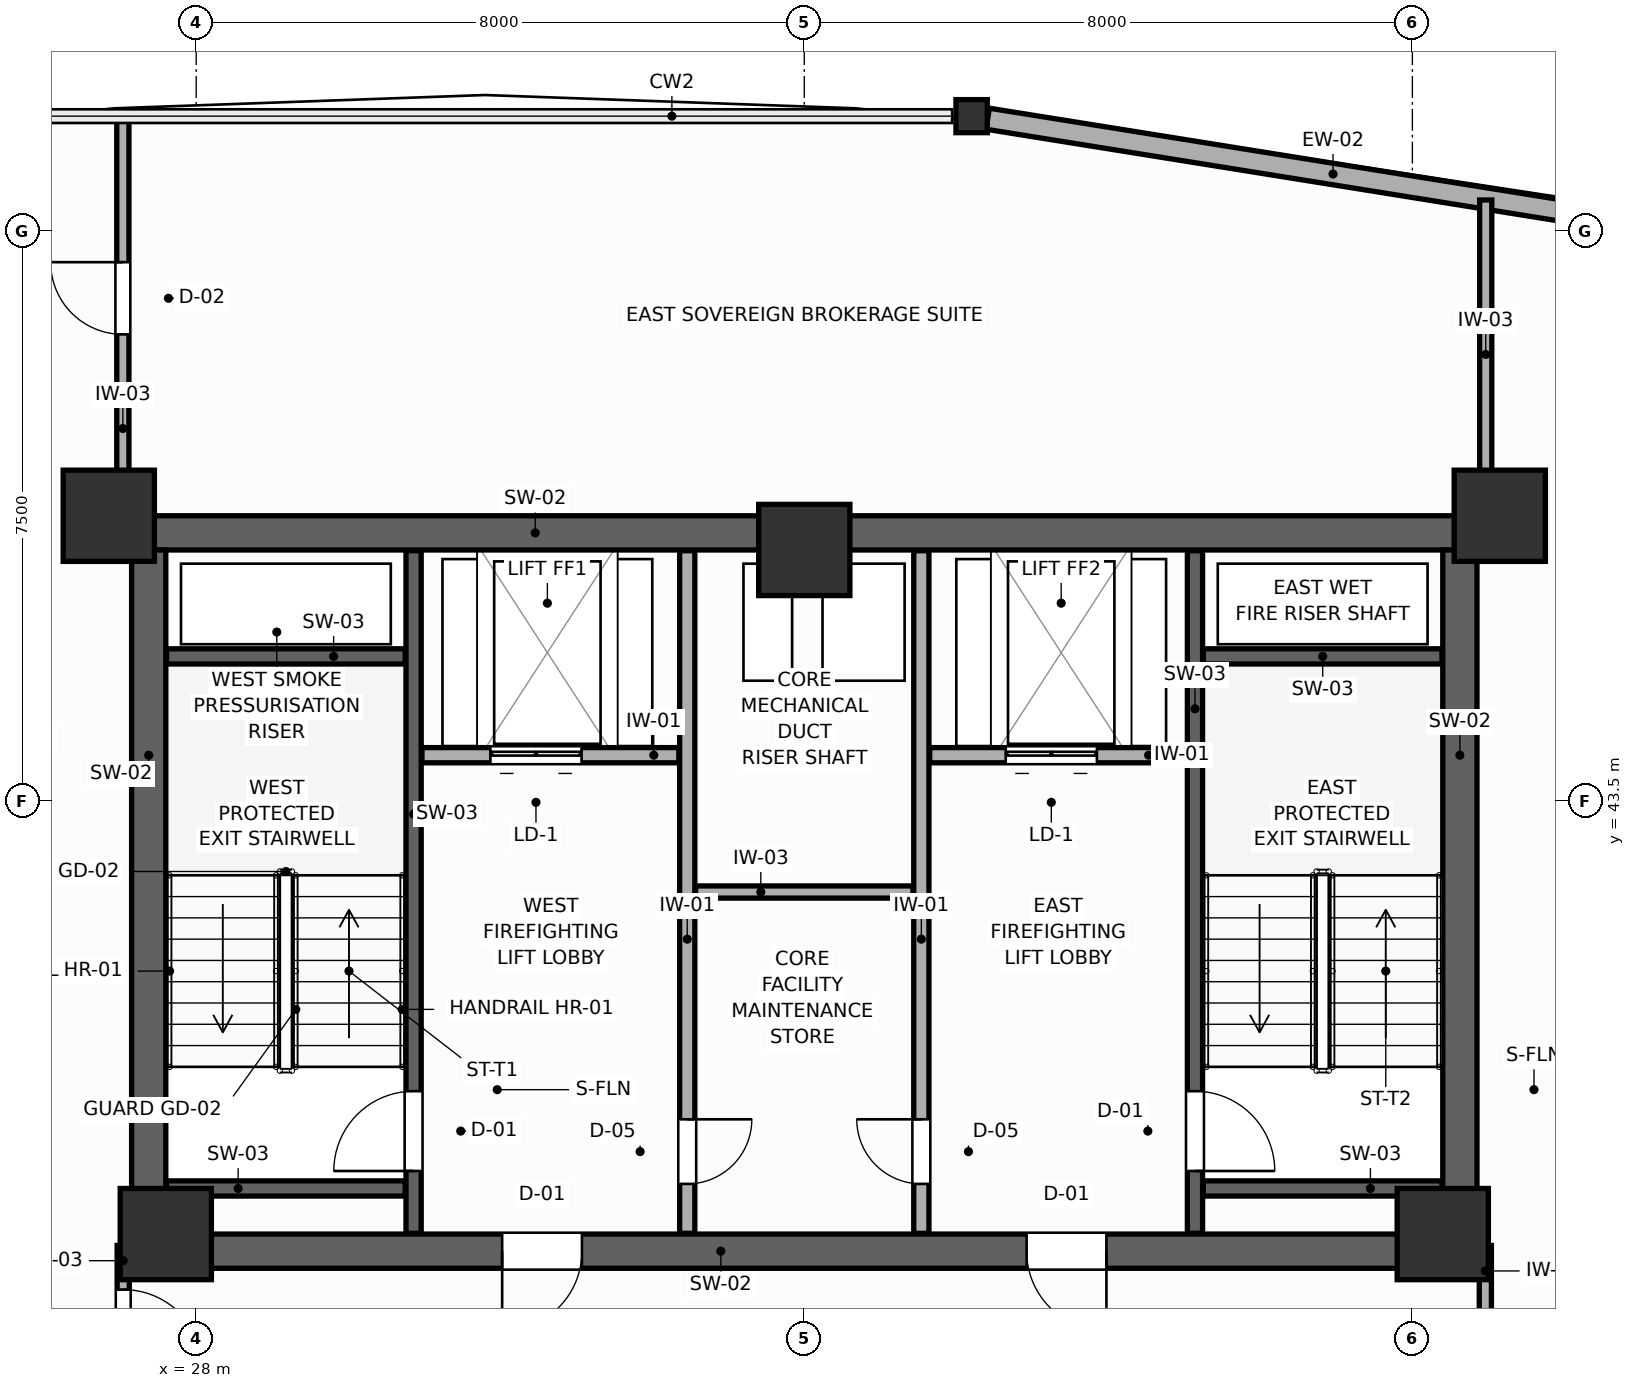
"""IFC4 building model, lengths in metres.
Left out: names, types, materials, properties, quantities, classifications, styles, units other than length and angle.
Written with IfcOpenShell. Run it as: python <this file> out.ifc"""

import sys

from ifc_helpers import new_model, si_unit, direction, frame, frame_2d, origin, origin_2d, place, context, subcontext, project, spatial, rectangle, i_section, extrude, source, transform, mapped, element, fill, save


model = new_model("IFC4")
c1 = context("Model", 3, precision=1e-05, world=origin(), true_north=direction((0.0, 1.0)))
c2 = subcontext(c1, "Body", "Model", "MODEL_VIEW")
j1 = project(units=[si_unit("LENGTHUNIT", "METRE"), si_unit("PLANEANGLEUNIT", "RADIAN")], contexts=[c1])
p1 = place(None, origin())
s1 = spatial("IfcSite", under=j1, at=p1, CompositionType="ELEMENT")
p2 = place(p1, origin())
s2 = spatial("IfcBuilding", under=s1, at=p2, CompositionType="ELEMENT")
p3 = place(p2, frame((0.0, 0.0, 157.8)))
s3 = spatial("IfcBuildingStorey", under=s2, at=p3, CompositionType="ELEMENT", Elevation=157.8)
p4 = place(p3, frame((27.15, 47.025, 0.0), z_axis=(0.0, 0.0, 1.0), x_axis=(1.0, 0.0, 0.0)))
e1 = element("IfcWall", 1, at=p4, inside=s3, PredefinedType="SHEAR", context=c2, shape_type="SweptSolid", body=[
    extrude(rectangle(XDim=17.7, YDim=0.45, at=frame_2d((8.85, 0.0))), origin(), (0.0, 0.0, 1.0), 3.6),
])
p5 = place(p3, frame((27.15, 37.575, 0.0), z_axis=(0.0, 0.0, 1.0), x_axis=(1.0, 0.0, 0.0)))
e2 = element("IfcWall", 2, at=p5, inside=s3, PredefinedType="SHEAR", context=c2, shape_type="SweptSolid", body=[
    extrude(rectangle(XDim=17.7, YDim=0.45, at=frame_2d((8.85, 0.0))), origin(), (0.0, 0.0, 1.0), 3.6),
])
p6 = place(p5, frame((4.875, 0.0, 0.0)))
e3 = element("IfcOpeningElement", 3, at=p6, cuts=e2, PredefinedType="OPENING", context=c2, shape_type="SweptSolid", body=[
    extrude(rectangle(XDim=1.05, YDim=2.1, at=frame_2d((0.525, 1.05))), frame((0.0, 0.235, 0.0), z_axis=(0.0, -1.0, 0.0), x_axis=(1.0, 0.0, 0.0)), (0.0, 0.0, 1.0), 0.47),
])
p7 = place(p5, frame((11.775, 0.0, 0.0)))
e4 = element("IfcOpeningElement", 4, at=p7, cuts=e2, PredefinedType="OPENING", context=c2, shape_type="SweptSolid", body=[
    extrude(rectangle(XDim=1.05, YDim=2.1, at=frame_2d((0.525, 1.05))), frame((0.0, 0.235, 0.0), z_axis=(0.0, -1.0, 0.0), x_axis=(1.0, 0.0, 0.0)), (0.0, 0.0, 1.0), 0.47),
])
for number, where, z_axis, x_axis in (
    (5, (27.375, 37.8, 0.0), (0.0, 0.0, 1.0), (0.0, 1.0, 0.0)),
    (6, (44.625, 37.8, 0.0), (0.0, 0.0, 1.0), (0.0, 1.0, 0.0)),
):
    element("IfcWall", number, at=place(p3, frame(where, z_axis=z_axis, x_axis=x_axis)), inside=s3, PredefinedType="SHEAR", context=c2, shape_type="SweptSolid", body=[
        extrude(rectangle(XDim=9.0, YDim=0.45, at=frame_2d((4.5, 0.0))), origin(), (0.0, 0.0, 1.0), 3.6),
    ])
m1 = source(origin(), c2, "Body", "SweptSolid", [
    extrude(rectangle(XDim=1.2, YDim=1.2, at=origin_2d()), origin(), (0.0, 0.0, 1.0), 3.6),
])
for number, where, z_axis, x_axis in (
    (7, (26.85, 47.25, 0.0), (0.0, 0.0, 1.0), (1.0, 0.0, 0.0)),
    (8, (45.15, 47.25, 0.0), (0.0, 0.0, 1.0), (1.0, 0.0, 0.0)),
    (9, (27.6, 37.8, 0.0), (0.0, 0.0, 1.0), (1.0, 0.0, 0.0)),
    (10, (44.4, 37.8, 0.0), (0.0, 0.0, 1.0), (1.0, 0.0, 0.0)),
    (11, (36.0, 46.8, 0.0), (0.0, 0.0, 1.0), (1.0, 0.0, 0.0)),
):
    element("IfcColumn", number, at=place(p3, frame(where, z_axis=z_axis, x_axis=x_axis)), inside=s3, PredefinedType="COLUMN", context=c2, shape_type="MappedRepresentation", body=[
        mapped(m1, transform((0.0, 0.0, 0.0), scale=1.0)),
    ])
m2 = source(origin(), c2, "Body", "SweptSolid", [
    extrude(i_section(OverallWidth=0.412, OverallDepth=0.435, WebThickness=0.033, FlangeThickness=0.053, FilletRadius=0.015, at=origin_2d()), origin(), (0.0, 0.0, 1.0), 3.6),
])
p8 = place(p3, frame((38.201, 52.508, 0.0), z_axis=(0.0, 0.0, 1.0), x_axis=(1.0, 0.0, 0.0)))
e12 = element("IfcColumn", 12, at=p8, inside=s3, PredefinedType="COLUMN", context=c2, shape_type="MappedRepresentation", body=[
    mapped(m2, transform((0.0, 0.0, 0.0), scale=1.0)),
])
p9 = place(p3, frame((52.708, 50.185, 0.0), z_axis=(0.0, 0.0, 1.0), x_axis=(-0.98742305143, 0.158100339991, 0.0)))
e13 = element("IfcWall", 13, at=p9, inside=s3, PredefinedType="SOLIDWALL", context=c2, shape_type="SweptSolid", body=[
    extrude(rectangle(XDim=14.477, YDim=0.28, at=frame_2d((7.239, 0.0))), origin(), (0.0, 0.0, 1.0), 3.0),
])
p10 = place(p9, frame((3.394, 0.0, 0.75)))
e14 = element("IfcOpeningElement", 14, at=p10, cuts=e13, PredefinedType="OPENING", context=c2, shape_type="SweptSolid", body=[
    extrude(rectangle(XDim=1.7, YDim=1.75, at=frame_2d((0.85, 0.875))), frame((0.0, 0.15, 0.0), z_axis=(0.0, -1.0, 0.0), x_axis=(1.0, 0.0, 0.0)), (0.0, 0.0, 1.0), 0.3),
])
p11 = place(p3, frame((30.86, 37.81, 0.0), z_axis=(0.0, 0.0, 1.0), x_axis=(0.0, 1.0, 0.0)))
e15 = element("IfcWall", 15, at=p11, inside=s3, PredefinedType="SHEAR", context=c2, shape_type="SweptSolid", body=[
    extrude(rectangle(XDim=8.98, YDim=0.2, at=frame_2d((4.49, 0.0))), origin(), (0.0, 0.0, 1.0), 3.6),
])
p12 = place(p11, frame((0.82, 0.0, 0.0)))
e16 = element("IfcOpeningElement", 16, at=p12, cuts=e15, PredefinedType="OPENING", context=c2, shape_type="SweptSolid", body=[
    extrude(rectangle(XDim=1.05, YDim=2.1, at=frame_2d((0.525, 1.05))), frame((0.0, 0.11, 0.0), z_axis=(0.0, -1.0, 0.0), x_axis=(1.0, 0.0, 0.0)), (0.0, 0.0, 1.0), 0.22),
])
for number, where, z_axis, x_axis in (
    (17, (27.61, 45.4, 0.0), (0.0, 0.0, 1.0), (1.0, 0.0, 0.0)),
    (18, (27.61, 38.4, 0.0), (0.0, 0.0, 1.0), (1.0, 0.0, 0.0)),
):
    element("IfcWall", number, at=place(p3, frame(where, z_axis=z_axis, x_axis=x_axis)), inside=s3, PredefinedType="SHEAR", context=c2, shape_type="SweptSolid", body=[
        extrude(rectangle(XDim=3.14, YDim=0.2, at=frame_2d((1.57, 0.0))), origin(), (0.0, 0.0, 1.0), 3.6),
    ])
p13 = place(p3, frame((41.14, 37.81, 0.0), z_axis=(0.0, 0.0, 1.0), x_axis=(0.0, 1.0, 0.0)))
e19 = element("IfcWall", 19, at=p13, inside=s3, PredefinedType="SHEAR", context=c2, shape_type="SweptSolid", body=[
    extrude(rectangle(XDim=8.98, YDim=0.2, at=frame_2d((4.49, 0.0))), origin(), (0.0, 0.0, 1.0), 3.6),
])
p14 = place(p13, frame((0.82, 0.0, 0.0)))
e20 = element("IfcOpeningElement", 20, at=p14, cuts=e19, PredefinedType="OPENING", context=c2, shape_type="SweptSolid", body=[
    extrude(rectangle(XDim=1.05, YDim=2.1, at=frame_2d((0.525, 1.05))), frame((0.0, 0.11, 0.0), z_axis=(0.0, -1.0, 0.0), x_axis=(1.0, 0.0, 0.0)), (0.0, 0.0, 1.0), 0.22),
])
for number, where, z_axis, x_axis in (
    (21, (41.25, 45.4, 0.0), (0.0, 0.0, 1.0), (1.0, 0.0, 0.0)),
    (22, (41.25, 38.4, 0.0), (0.0, 0.0, 1.0), (1.0, 0.0, 0.0)),
):
    element("IfcWall", number, at=place(p3, frame(where, z_axis=z_axis, x_axis=x_axis)), inside=s3, PredefinedType="SHEAR", context=c2, shape_type="SweptSolid", body=[
        extrude(rectangle(XDim=3.14, YDim=0.2, at=frame_2d((1.57, 0.0))), origin(), (0.0, 0.0, 1.0), 3.6),
    ])
p15 = place(p3, frame((30.97, 44.1, 0.0), z_axis=(0.0, 0.0, 1.0), x_axis=(1.0, 0.0, 0.0)))
e23 = element("IfcWall", 23, at=p15, inside=s3, PredefinedType="PARTITIONING", context=c2, shape_type="SweptSolid", body=[
    extrude(rectangle(XDim=3.38, YDim=0.2, at=frame_2d((1.69, 0.0))), origin(), (0.0, 0.0, 1.0), 3.4),
])
p16 = place(p15, frame((0.9, 0.0, 0.0)))
e24 = element("IfcOpeningElement", 24, at=p16, cuts=e23, PredefinedType="OPENING", context=c2, shape_type="SweptSolid", body=[
    extrude(rectangle(XDim=1.2, YDim=2.1, at=frame_2d((0.6, 1.05))), frame((0.0, 0.11, 0.0), z_axis=(0.0, -1.0, 0.0), x_axis=(1.0, 0.0, 0.0)), (0.0, 0.0, 1.0), 0.22),
])
p17 = place(p3, frame((37.65, 44.1, 0.0), z_axis=(0.0, 0.0, 1.0), x_axis=(1.0, 0.0, 0.0)))
e25 = element("IfcWall", 25, at=p17, inside=s3, PredefinedType="PARTITIONING", context=c2, shape_type="SweptSolid", body=[
    extrude(rectangle(XDim=3.38, YDim=0.2, at=frame_2d((1.69, 0.0))), origin(), (0.0, 0.0, 1.0), 3.4),
])
p18 = place(p17, frame((1.0, 0.0, 0.0)))
e26 = element("IfcOpeningElement", 26, at=p18, cuts=e25, PredefinedType="OPENING", context=c2, shape_type="SweptSolid", body=[
    extrude(rectangle(XDim=1.2, YDim=2.1, at=frame_2d((0.6, 1.05))), frame((0.0, 0.11, 0.0), z_axis=(0.0, -1.0, 0.0), x_axis=(1.0, 0.0, 0.0)), (0.0, 0.0, 1.0), 0.22),
])
p19 = place(p3, frame((34.46, 37.81, 0.0), z_axis=(0.0, 0.0, 1.0), x_axis=(0.0, 1.0, 0.0)))
e27 = element("IfcWall", 27, at=p19, inside=s3, PredefinedType="PARTITIONING", context=c2, shape_type="SweptSolid", body=[
    extrude(rectangle(XDim=8.98, YDim=0.2, at=frame_2d((4.49, 0.0))), origin(), (0.0, 0.0, 1.0), 3.4),
])
p20 = place(p19, frame((0.65, 0.0, 0.0)))
e28 = element("IfcOpeningElement", 28, at=p20, cuts=e27, PredefinedType="OPENING", context=c2, shape_type="SweptSolid", body=[
    extrude(rectangle(XDim=0.85, YDim=2.05, at=frame_2d((0.425, 1.025))), frame((0.0, 0.11, 0.0), z_axis=(0.0, -1.0, 0.0), x_axis=(1.0, 0.0, 0.0)), (0.0, 0.0, 1.0), 0.22),
])
p21 = place(p3, frame((37.54, 37.81, 0.0), z_axis=(0.0, 0.0, 1.0), x_axis=(0.0, 1.0, 0.0)))
e29 = element("IfcWall", 29, at=p21, inside=s3, PredefinedType="PARTITIONING", context=c2, shape_type="SweptSolid", body=[
    extrude(rectangle(XDim=8.98, YDim=0.2, at=frame_2d((4.49, 0.0))), origin(), (0.0, 0.0, 1.0), 3.4),
])
p22 = place(p21, frame((0.65, 0.0, 0.0)))
e30 = element("IfcOpeningElement", 30, at=p22, cuts=e29, PredefinedType="OPENING", context=c2, shape_type="SweptSolid", body=[
    extrude(rectangle(XDim=0.85, YDim=2.05, at=frame_2d((0.425, 1.025))), frame((0.0, 0.11, 0.0), z_axis=(0.0, -1.0, 0.0), x_axis=(1.0, 0.0, 0.0)), (0.0, 0.0, 1.0), 0.22),
])
p23 = place(p3, frame((34.57, 42.3, 0.0), z_axis=(0.0, 0.0, 1.0), x_axis=(1.0, 0.0, 0.0)))
e31 = element("IfcWall", 31, at=p23, inside=s3, PredefinedType="PARTITIONING", context=c2, shape_type="SweptSolid", body=[
    extrude(rectangle(XDim=2.86, YDim=0.16, at=frame_2d((1.43, 0.0))), origin(), (0.0, 0.0, 1.0), 3.4),
])
p24 = place(p3, frame((27.04, 35.54, 0.0), z_axis=(0.0, 0.0, 1.0), x_axis=(0.0, 1.0, 0.0)))
e32 = element("IfcWall", 32, at=p24, inside=s3, PredefinedType="PARTITIONING", context=c2, shape_type="SweptSolid", body=[
    extrude(rectangle(XDim=2.11, YDim=0.16, at=frame_2d((1.055, 0.0))), origin(), (0.0, 0.0, 1.0), 3.4),
])
p25 = place(p24, frame((0.48, 0.0, 0.0)))
e33 = element("IfcOpeningElement", 33, at=p25, cuts=e32, PredefinedType="OPENING", context=c2, shape_type="SweptSolid", body=[
    extrude(rectangle(XDim=1.05, YDim=2.1, at=frame_2d((0.525, 1.05))), frame((0.0, 0.09, 0.0), z_axis=(0.0, -1.0, 0.0), x_axis=(1.0, 0.0, 0.0)), (0.0, 0.0, 1.0), 0.18),
])
p26 = place(p3, frame((44.96, 35.0, 0.0), z_axis=(0.0, 0.0, 1.0), x_axis=(0.0, 1.0, 0.0)))
e34 = element("IfcWall", 34, at=p26, inside=s3, PredefinedType="PARTITIONING", context=c2, shape_type="SweptSolid", body=[
    extrude(rectangle(XDim=2.65, YDim=0.16, at=frame_2d((1.325, 0.0))), origin(), (0.0, 0.0, 1.0), 3.4),
])
p27 = place(p26, frame((0.75, 0.0, 0.0)))
e35 = element("IfcOpeningElement", 35, at=p27, cuts=e34, PredefinedType="OPENING", context=c2, shape_type="SweptSolid", body=[
    extrude(rectangle(XDim=1.05, YDim=2.1, at=frame_2d((0.525, 1.05))), frame((0.0, 0.09, 0.0), z_axis=(0.0, -1.0, 0.0), x_axis=(1.0, 0.0, 0.0)), (0.0, 0.0, 1.0), 0.18),
])
p28 = place(p3, frame((27.035, 47.34, 0.0), z_axis=(0.0, 0.0, 1.0), x_axis=(0.0, 1.0, 0.0)))
e36 = element("IfcWall", 36, at=p28, inside=s3, PredefinedType="PARTITIONING", context=c2, shape_type="SweptSolid", body=[
    extrude(rectangle(XDim=5.147, YDim=0.16, at=frame_2d((2.574, 0.0))), origin(), (0.0, 0.0, 1.0), 3.4),
])
p29 = place(p28, frame((2.296, 0.0, 0.0)))
e37 = element("IfcOpeningElement", 37, at=p29, cuts=e36, PredefinedType="OPENING", context=c2, shape_type="SweptSolid", body=[
    extrude(rectangle(XDim=0.95, YDim=2.05, at=frame_2d((0.475, 1.025))), frame((0.0, 0.09, 0.0), z_axis=(0.0, -1.0, 0.0), x_axis=(1.0, 0.0, 0.0)), (0.0, 0.0, 1.0), 0.18),
])
p30 = place(p3, frame((44.965, 47.34, 0.0), z_axis=(0.0, 0.0, 1.0), x_axis=(0.0, 1.0, 0.0)))
e38 = element("IfcWall", 38, at=p30, inside=s3, PredefinedType="PARTITIONING", context=c2, shape_type="SweptSolid", body=[
    extrude(rectangle(XDim=4.064, YDim=0.16, at=frame_2d((2.032, 0.0))), origin(), (0.0, 0.0, 1.0), 3.4),
])
p31 = place(p12, origin())
e39 = element("IfcDoor", 39, at=p31, inside=s3, OperationType="SINGLE_SWING_LEFT", PredefinedType="DOOR", context=c2, shape_type="SweptSolid", body=[
    extrude(rectangle(XDim=1.05, YDim=2.1, at=frame_2d((0.525, 1.05))), frame((0.0, 0.025, 0.0), z_axis=(0.0, -1.0, 0.0), x_axis=(1.0, 0.0, 0.0)), (0.0, 0.0, 1.0), 0.05),
])
fill(e16, e39)
p32 = place(p14, frame((1.05, 0.0, 0.0), z_axis=(0.0, 0.0, 1.0), x_axis=(-1.0, 0.0, 0.0)))
e40 = element("IfcDoor", 40, at=p32, inside=s3, OperationType="SINGLE_SWING_RIGHT", PredefinedType="DOOR", context=c2, shape_type="SweptSolid", body=[
    extrude(rectangle(XDim=1.05, YDim=2.1, at=frame_2d((0.525, 1.05))), frame((0.0, 0.025, 0.0), z_axis=(0.0, -1.0, 0.0), x_axis=(1.0, 0.0, 0.0)), (0.0, 0.0, 1.0), 0.05),
])
fill(e20, e40)
p33 = place(p16, origin())
e41 = element("IfcDoor", 41, at=p33, inside=s3, OperationType="DOUBLE_DOOR_SLIDING", PredefinedType="DOOR", context=c2, shape_type="SweptSolid", body=[
    extrude(rectangle(XDim=1.2, YDim=2.1, at=frame_2d((0.6, 1.05))), frame((0.0, 0.025, 0.0), z_axis=(0.0, -1.0, 0.0), x_axis=(1.0, 0.0, 0.0)), (0.0, 0.0, 1.0), 0.05),
])
fill(e24, e41)
p34 = place(p18, origin())
e42 = element("IfcDoor", 42, at=p34, inside=s3, OperationType="DOUBLE_DOOR_SLIDING", PredefinedType="DOOR", context=c2, shape_type="SweptSolid", body=[
    extrude(rectangle(XDim=1.2, YDim=2.1, at=frame_2d((0.6, 1.05))), frame((0.0, 0.025, 0.0), z_axis=(0.0, -1.0, 0.0), x_axis=(1.0, 0.0, 0.0)), (0.0, 0.0, 1.0), 0.05),
])
fill(e26, e42)
p35 = place(p20, frame((0.85, 0.0, 0.0), z_axis=(0.0, 0.0, 1.0), x_axis=(-1.0, 0.0, 0.0)))
e43 = element("IfcDoor", 43, at=p35, inside=s3, OperationType="SINGLE_SWING_LEFT", PredefinedType="DOOR", context=c2, shape_type="SweptSolid", body=[
    extrude(rectangle(XDim=0.85, YDim=2.05, at=frame_2d((0.425, 1.025))), frame((0.0, 0.025, 0.0), z_axis=(0.0, -1.0, 0.0), x_axis=(1.0, 0.0, 0.0)), (0.0, 0.0, 1.0), 0.05),
])
fill(e28, e43)
p36 = place(p22, origin())
e44 = element("IfcDoor", 44, at=p36, inside=s3, OperationType="SINGLE_SWING_RIGHT", PredefinedType="DOOR", context=c2, shape_type="SweptSolid", body=[
    extrude(rectangle(XDim=0.85, YDim=2.05, at=frame_2d((0.425, 1.025))), frame((0.0, 0.025, 0.0), z_axis=(0.0, -1.0, 0.0), x_axis=(1.0, 0.0, 0.0)), (0.0, 0.0, 1.0), 0.05),
])
fill(e30, e44)
p37 = place(p25, frame((1.05, 0.0, 0.0), z_axis=(0.0, 0.0, 1.0), x_axis=(-1.0, 0.0, 0.0)))
e45 = element("IfcDoor", 45, at=p37, inside=s3, OperationType="SINGLE_SWING_RIGHT", PredefinedType="DOOR", context=c2, shape_type="SweptSolid", body=[
    extrude(rectangle(XDim=1.05, YDim=2.1, at=frame_2d((0.525, 1.05))), frame((0.0, 0.025, 0.0), z_axis=(0.0, -1.0, 0.0), x_axis=(1.0, 0.0, 0.0)), (0.0, 0.0, 1.0), 0.05),
])
fill(e33, e45)
p38 = place(p29, origin())
e46 = element("IfcDoor", 46, at=p38, inside=s3, OperationType="SINGLE_SWING_RIGHT", PredefinedType="DOOR", context=c2, shape_type="SweptSolid", body=[
    extrude(rectangle(XDim=0.95, YDim=2.05, at=frame_2d((0.475, 1.025))), frame((0.0, 0.025, 0.0), z_axis=(0.0, -1.0, 0.0), x_axis=(1.0, 0.0, 0.0)), (0.0, 0.0, 1.0), 0.05),
])
fill(e37, e46)
p39 = place(p6, frame((1.05, 0.0, 0.0), z_axis=(0.0, 0.0, 1.0), x_axis=(-1.0, 0.0, 0.0)))
e47 = element("IfcDoor", 47, at=p39, inside=s3, OperationType="SINGLE_SWING_RIGHT", PredefinedType="DOOR", context=c2, shape_type="SweptSolid", body=[
    extrude(rectangle(XDim=1.05, YDim=2.1, at=frame_2d((0.525, 1.05))), frame((0.0, 0.025, 0.0), z_axis=(0.0, -1.0, 0.0), x_axis=(1.0, 0.0, 0.0)), (0.0, 0.0, 1.0), 0.05),
])
fill(e3, e47)
p40 = place(p7, frame((1.05, 0.0, 0.0), z_axis=(0.0, 0.0, 1.0), x_axis=(-1.0, 0.0, 0.0)))
e48 = element("IfcDoor", 48, at=p40, inside=s3, OperationType="SINGLE_SWING_LEFT", PredefinedType="DOOR", context=c2, shape_type="SweptSolid", body=[
    extrude(rectangle(XDim=1.05, YDim=2.1, at=frame_2d((0.525, 1.05))), frame((0.0, 0.025, 0.0), z_axis=(0.0, -1.0, 0.0), x_axis=(1.0, 0.0, 0.0)), (0.0, 0.0, 1.0), 0.05),
])
fill(e4, e48)
save(model, sys.argv[1])
